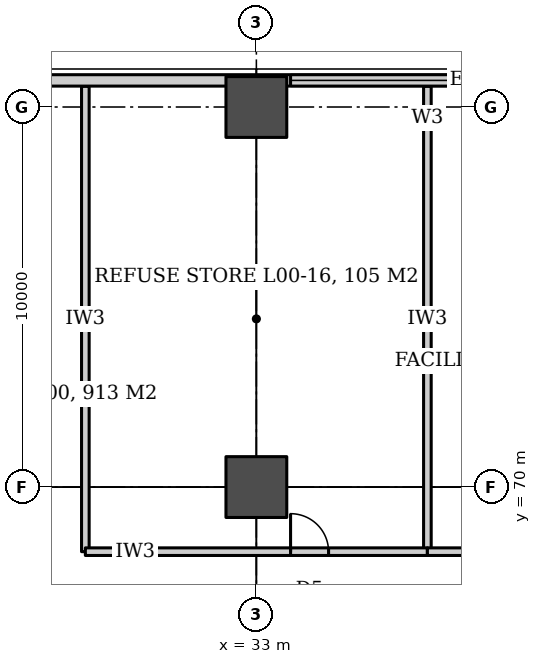
"""IFC4 building model, lengths in metres.
Left out: names, types, materials, properties, quantities, classifications, styles, units other than length and angle.
Written with IfcOpenShell. Run it as: python <this file> out.ifc"""

import sys

from ifc_helpers import new_model, si_unit, direction, frame, frame_2d, origin, origin_2d, place, context, subcontext, project, spatial, rectangle, extrude, element, fill, save


model = new_model("IFC4")
c1 = context("Model", 3, precision=1e-05, world=origin(), true_north=direction((0.0, 1.0)))
c2 = subcontext(c1, "Body", "Model", "MODEL_VIEW")
j1 = project(units=[si_unit("LENGTHUNIT", "METRE"), si_unit("PLANEANGLEUNIT", "RADIAN")], contexts=[c1])
p1 = place(None, origin())
s1 = spatial("IfcSite", under=j1, at=p1, CompositionType="ELEMENT")
p2 = place(p1, origin())
s2 = spatial("IfcBuilding", under=s1, at=p2, CompositionType="ELEMENT")
p3 = place(p2, origin())
s3 = spatial("IfcBuildingStorey", under=s2, at=p3, CompositionType="ELEMENT", Elevation=0.0)
for number, where, z_axis, x_axis in (
    (1, (33.0, 70.0, 0.0), (0.0, 0.0, 1.0), (1.0, 0.0, 0.0)),
    (2, (33.0, 80.0, 0.0), (0.0, 0.0, 1.0), (1.0, 0.0, 0.0)),
):
    element("IfcColumn", number, at=place(p3, frame(where, z_axis=z_axis, x_axis=x_axis)), inside=s3, PredefinedType="COLUMN", context=c2, shape_type="SweptSolid", body=[
        extrude(rectangle(XDim=1.6, YDim=1.6, at=origin_2d()), origin(), (0.0, 0.0, 1.0), 6.0),
    ])
for number, where, z_axis, x_axis in (
    (3, (28.5, 68.3, 0.0), (0.0, 0.0, 1.0), (0.0, 1.0, 0.0)),
    (4, (37.5, 68.3, 0.0), (0.0, 0.0, 1.0), (0.0, 1.0, 0.0)),
):
    element("IfcWall", number, at=place(p3, frame(where, z_axis=z_axis, x_axis=x_axis)), inside=s3, PredefinedType="PARTITIONING", context=c2, shape_type="SweptSolid", body=[
        extrude(rectangle(XDim=12.245, YDim=0.2, at=frame_2d((6.123, 0.0))), origin(), (0.0, 0.0, 1.0), 3.68),
    ])
p4 = place(p3, frame((28.5, 68.3, 0.0), z_axis=(0.0, 0.0, 1.0), x_axis=(1.0, 0.0, 0.0)))
e5 = element("IfcWall", 5, at=p4, inside=s3, PredefinedType="PARTITIONING", context=c2, shape_type="SweptSolid", body=[
    extrude(rectangle(XDim=9.0, YDim=0.2, at=frame_2d((4.5, 0.0))), origin(), (0.0, 0.0, 1.0), 3.68),
])
p5 = place(p4, frame((5.4, 0.0, 0.0)))
e6 = element("IfcOpeningElement", 6, at=p5, cuts=e5, PredefinedType="OPENING", context=c2, shape_type="SweptSolid", body=[
    extrude(rectangle(XDim=1.0, YDim=2.1, at=frame_2d((0.5, 1.05))), frame((0.0, 0.11, 0.0), z_axis=(0.0, -1.0, 0.0), x_axis=(1.0, 0.0, 0.0)), (0.0, 0.0, 1.0), 0.22),
])
p6 = place(p3, frame((37.5, 68.3, 0.0), z_axis=(0.0, 0.0, 1.0), x_axis=(1.0, 0.0, 0.0)))
e7 = element("IfcWall", 7, at=p6, inside=s3, PredefinedType="PARTITIONING", context=c2, shape_type="SweptSolid", body=[
    extrude(rectangle(XDim=9.0, YDim=0.2, at=frame_2d((4.5, 0.0))), origin(), (0.0, 0.0, 1.0), 3.68),
])
p7 = place(p6, frame((3.3, 0.0, 0.0)))
e8 = element("IfcOpeningElement", 8, at=p7, cuts=e7, PredefinedType="OPENING", context=c2, shape_type="SweptSolid", body=[
    extrude(rectangle(XDim=2.4, YDim=2.7, at=frame_2d((1.2, 1.35))), frame((0.0, 0.11, 0.0), z_axis=(0.0, -1.0, 0.0), x_axis=(1.0, 0.0, 0.0)), (0.0, 0.0, 1.0), 0.22),
])
p8 = place(p3, frame((95.0, 80.7, 0.0), z_axis=(0.0, 0.0, 1.0), x_axis=(-1.0, 0.0, 0.0)))
e9 = element("IfcWall", 9, at=p8, inside=s3, PredefinedType="SOLIDWALL", context=c2, shape_type="SweptSolid", body=[
    extrude(rectangle(XDim=70.0, YDim=0.3, at=frame_2d((35.0, 0.0))), origin(), (0.0, 0.0, 1.0), 5.7),
])
p9 = place(p8, frame((53.9, 0.0, 0.6)))
e10 = element("IfcOpeningElement", 10, at=p9, cuts=e9, PredefinedType="OPENING", context=c2, shape_type="SweptSolid", body=[
    extrude(rectangle(XDim=7.2, YDim=3.6, at=frame_2d((3.6, 1.8))), frame((0.0, 0.16, 0.0), z_axis=(0.0, -1.0, 0.0), x_axis=(1.0, 0.0, 0.0)), (0.0, 0.0, 1.0), 0.32),
])
p10 = place(p8, frame((44.9, 0.0, 0.6)))
e11 = element("IfcOpeningElement", 11, at=p10, cuts=e9, PredefinedType="OPENING", context=c2, shape_type="SweptSolid", body=[
    extrude(rectangle(XDim=7.2, YDim=3.6, at=frame_2d((3.6, 1.8))), frame((0.0, 0.16, 0.0), z_axis=(0.0, -1.0, 0.0), x_axis=(1.0, 0.0, 0.0)), (0.0, 0.0, 1.0), 0.32),
])
p11 = place(p8, frame((36.9, 0.0, 0.0)))
e12 = element("IfcOpeningElement", 12, at=p11, cuts=e9, PredefinedType="OPENING", context=c2, shape_type="SweptSolid", body=[
    extrude(rectangle(XDim=5.0, YDim=4.5, at=frame_2d((2.5, 2.25))), frame((0.0, 0.16, 0.0), z_axis=(0.0, -1.0, 0.0), x_axis=(1.0, 0.0, 0.0)), (0.0, 0.0, 1.0), 0.32),
])
p12 = place(p8, frame((28.1, 0.0, 0.0)))
e13 = element("IfcOpeningElement", 13, at=p12, cuts=e9, PredefinedType="OPENING", context=c2, shape_type="SweptSolid", body=[
    extrude(rectangle(XDim=5.0, YDim=4.5, at=frame_2d((2.5, 2.25))), frame((0.0, 0.16, 0.0), z_axis=(0.0, -1.0, 0.0), x_axis=(1.0, 0.0, 0.0)), (0.0, 0.0, 1.0), 0.32),
])
p13 = place(p8, frame((17.9, 0.0, 0.6)))
e14 = element("IfcOpeningElement", 14, at=p13, cuts=e9, PredefinedType="OPENING", context=c2, shape_type="SweptSolid", body=[
    extrude(rectangle(XDim=7.2, YDim=3.6, at=frame_2d((3.6, 1.8))), frame((0.0, 0.16, 0.0), z_axis=(0.0, -1.0, 0.0), x_axis=(1.0, 0.0, 0.0)), (0.0, 0.0, 1.0), 0.32),
])
p14 = place(p8, frame((8.9, 0.0, 0.6)))
e15 = element("IfcOpeningElement", 15, at=p14, cuts=e9, PredefinedType="OPENING", context=c2, shape_type="SweptSolid", body=[
    extrude(rectangle(XDim=7.2, YDim=3.6, at=frame_2d((3.6, 1.8))), frame((0.0, 0.16, 0.0), z_axis=(0.0, -1.0, 0.0), x_axis=(1.0, 0.0, 0.0)), (0.0, 0.0, 1.0), 0.32),
])
p15 = place(p8, frame((0.8, 0.0, 0.0)))
e16 = element("IfcOpeningElement", 16, at=p15, cuts=e9, PredefinedType="OPENING", context=c2, shape_type="SweptSolid", body=[
    extrude(rectangle(XDim=2.0, YDim=3.0, at=frame_2d((1.0, 1.5))), frame((0.0, 0.16, 0.0), z_axis=(0.0, -1.0, 0.0), x_axis=(1.0, 0.0, 0.0)), (0.0, 0.0, 1.0), 0.32),
])
p16 = place(p5, origin())
e17 = element("IfcDoor", 17, at=p16, inside=s3, OperationType="SINGLE_SWING_LEFT", PredefinedType="DOOR", context=c2, shape_type="SweptSolid", body=[
    extrude(rectangle(XDim=1.0, YDim=2.1, at=frame_2d((0.5, 1.05))), frame((0.0, 0.025, 0.0), z_axis=(0.0, -1.0, 0.0), x_axis=(1.0, 0.0, 0.0)), (0.0, 0.0, 1.0), 0.05),
])
fill(e6, e17)
p17 = place(p9, origin())
e18 = element("IfcWindow", 18, at=p17, inside=s3, PartitioningType="SINGLE_PANEL", PredefinedType="WINDOW", context=c2, shape_type="SweptSolid", body=[
    extrude(rectangle(XDim=7.2, YDim=3.6, at=frame_2d((3.6, 1.8))), frame((0.0, 0.03, 0.0), z_axis=(0.0, -1.0, 0.0), x_axis=(1.0, 0.0, 0.0)), (0.0, 0.0, 1.0), 0.06),
])
fill(e10, e18)
save(model, sys.argv[1])
